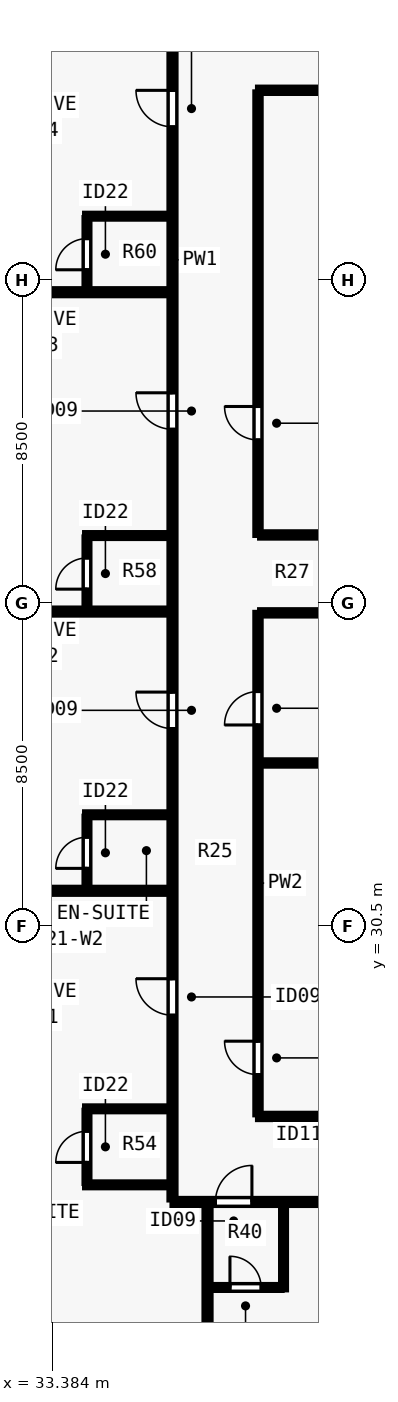
"""IFC4 building model, lengths in metres.
Left out: names, types, materials, properties, quantities, classifications, styles, units other than length and angle.
Written with IfcOpenShell. Run it as: python <this file> out.ifc"""

import sys

from ifc_helpers import new_model, si_unit, direction, frame, frame_2d, origin, place, context, subcontext, project, spatial, rectangle, extrude, element, fill, save


model = new_model("IFC4")
c1 = context("Model", 3, precision=1e-05, world=origin(), true_north=direction((0.0, 1.0)))
c2 = subcontext(c1, "Body", "Model", "MODEL_VIEW")
j1 = project(units=[si_unit("LENGTHUNIT", "METRE"), si_unit("PLANEANGLEUNIT", "RADIAN")], contexts=[c1])
p1 = place(None, origin())
s1 = spatial("IfcSite", under=j1, at=p1, CompositionType="ELEMENT")
p2 = place(p1, origin())
s2 = spatial("IfcBuilding", under=s1, at=p2, CompositionType="ELEMENT")
p3 = place(p2, frame((0.0, 0.0, 79.5)))
s3 = spatial("IfcBuildingStorey", under=s2, at=p3, CompositionType="ELEMENT", Elevation=79.5)
p4 = place(p3, frame((36.55, 23.25, 0.0), z_axis=(0.0, 0.0, 1.0), x_axis=(1.0, 0.0, 0.0)))
e1 = element("IfcWall", 1, at=p4, inside=s3, PredefinedType="PARTITIONING", context=c2, shape_type="SweptSolid", body=[
    extrude(rectangle(XDim=30.9, YDim=0.16, at=frame_2d((15.45, 0.0))), origin(), (0.0, 0.0, 1.0), 3.28),
])
p5 = place(p4, frame((1.13, 0.0, 0.0)))
e2 = element("IfcOpeningElement", 2, at=p5, cuts=e1, PredefinedType="OPENING", context=c2, shape_type="SweptSolid", body=[
    extrude(rectangle(XDim=0.96, YDim=2.15, at=frame_2d((0.48, 1.075))), frame((0.0, 0.09, 0.0), z_axis=(0.0, -1.0, 0.0), x_axis=(1.0, 0.0, 0.0)), (0.0, 0.0, 1.0), 0.18),
])
p6 = place(p4, frame((6.093, 0.0, 0.0)))
e3 = element("IfcOpeningElement", 3, at=p6, cuts=e1, PredefinedType="OPENING", context=c2, shape_type="SweptSolid", body=[
    extrude(rectangle(XDim=0.96, YDim=2.15, at=frame_2d((0.48, 1.075))), frame((0.0, 0.09, 0.0), z_axis=(0.0, -1.0, 0.0), x_axis=(1.0, 0.0, 0.0)), (0.0, 0.0, 1.0), 0.18),
])
p7 = place(p4, frame((16.125, 0.0, 0.0)))
e4 = element("IfcOpeningElement", 4, at=p7, cuts=e1, PredefinedType="OPENING", context=c2, shape_type="SweptSolid", body=[
    extrude(rectangle(XDim=0.96, YDim=2.15, at=frame_2d((0.48, 1.075))), frame((0.0, 0.09, 0.0), z_axis=(0.0, -1.0, 0.0), x_axis=(1.0, 0.0, 0.0)), (0.0, 0.0, 1.0), 0.18),
])
p8 = place(p4, frame((26.157, 0.0, 0.0)))
e5 = element("IfcOpeningElement", 5, at=p8, cuts=e1, PredefinedType="OPENING", context=c2, shape_type="SweptSolid", body=[
    extrude(rectangle(XDim=0.96, YDim=2.15, at=frame_2d((0.48, 1.075))), frame((0.0, 0.09, 0.0), z_axis=(0.0, -1.0, 0.0), x_axis=(1.0, 0.0, 0.0)), (0.0, 0.0, 1.0), 0.18),
])
p9 = place(p4, frame((28.92, 0.0, 0.0)))
e6 = element("IfcOpeningElement", 6, at=p9, cuts=e1, PredefinedType="OPENING", context=c2, shape_type="SweptSolid", body=[
    extrude(rectangle(XDim=0.96, YDim=2.15, at=frame_2d((0.48, 1.075))), frame((0.0, 0.09, 0.0), z_axis=(0.0, -1.0, 0.0), x_axis=(1.0, 0.0, 0.0)), (0.0, 0.0, 1.0), 0.18),
])
p10 = place(p3, frame((36.55, 23.315, 0.0), z_axis=(0.0, 0.0, 1.0), x_axis=(0.0, 1.0, 0.0)))
e7 = element("IfcWall", 7, at=p10, inside=s3, PredefinedType="PARTITIONING", context=c2, shape_type="SweptSolid", body=[
    extrude(rectangle(XDim=31.37, YDim=0.16, at=frame_2d((15.685, 0.0))), origin(), (0.0, 0.0, 1.0), 3.28),
])
p11 = place(p10, frame((4.848, 0.0, 0.0)))
e8 = element("IfcOpeningElement", 8, at=p11, cuts=e7, PredefinedType="OPENING", context=c2, shape_type="SweptSolid", body=[
    extrude(rectangle(XDim=0.96, YDim=2.15, at=frame_2d((0.48, 1.075))), frame((0.0, 0.09, 0.0), z_axis=(0.0, -1.0, 0.0), x_axis=(1.0, 0.0, 0.0)), (0.0, 0.0, 1.0), 0.18),
])
p12 = place(p10, frame((12.39, 0.0, 0.0)))
e9 = element("IfcOpeningElement", 9, at=p12, cuts=e7, PredefinedType="OPENING", context=c2, shape_type="SweptSolid", body=[
    extrude(rectangle(XDim=0.96, YDim=2.15, at=frame_2d((0.48, 1.075))), frame((0.0, 0.09, 0.0), z_axis=(0.0, -1.0, 0.0), x_axis=(1.0, 0.0, 0.0)), (0.0, 0.0, 1.0), 0.18),
])
p13 = place(p10, frame((20.265, 0.0, 0.0)))
e10 = element("IfcOpeningElement", 10, at=p13, cuts=e7, PredefinedType="OPENING", context=c2, shape_type="SweptSolid", body=[
    extrude(rectangle(XDim=0.96, YDim=2.15, at=frame_2d((0.48, 1.075))), frame((0.0, 0.09, 0.0), z_axis=(0.0, -1.0, 0.0), x_axis=(1.0, 0.0, 0.0)), (0.0, 0.0, 1.0), 0.18),
])
p14 = place(p10, frame((28.223, 0.0, 0.0)))
e11 = element("IfcOpeningElement", 11, at=p14, cuts=e7, PredefinedType="OPENING", context=c2, shape_type="SweptSolid", body=[
    extrude(rectangle(XDim=0.96, YDim=2.15, at=frame_2d((0.48, 1.075))), frame((0.0, 0.09, 0.0), z_axis=(0.0, -1.0, 0.0), x_axis=(1.0, 0.0, 0.0)), (0.0, 0.0, 1.0), 0.18),
])
p15 = place(p3, frame((38.8, 25.5, 0.0), z_axis=(0.0, 0.0, 1.0), x_axis=(1.0, 0.0, 0.0)))
e12 = element("IfcWall", 12, at=p15, inside=s3, PredefinedType="PARTITIONING", context=c2, shape_type="SweptSolid", body=[
    extrude(rectangle(XDim=26.4, YDim=0.14, at=frame_2d((13.2, 0.0))), origin(), (0.0, 0.0, 1.0), 3.28),
])
p16 = place(p15, frame((2.2, 0.0, 0.0)))
e13 = element("IfcOpeningElement", 13, at=p16, cuts=e12, PredefinedType="OPENING", context=c2, shape_type="SweptSolid", body=[
    extrude(rectangle(XDim=0.96, YDim=2.12, at=frame_2d((0.48, 1.06))), frame((0.0, 0.08, 0.0), z_axis=(0.0, -1.0, 0.0), x_axis=(1.0, 0.0, 0.0)), (0.0, 0.0, 1.0), 0.16),
])
p17 = place(p15, frame((15.2, 0.0, 0.0)))
e14 = element("IfcOpeningElement", 14, at=p17, cuts=e12, PredefinedType="OPENING", context=c2, shape_type="SweptSolid", body=[
    extrude(rectangle(XDim=0.96, YDim=2.12, at=frame_2d((0.48, 1.06))), frame((0.0, 0.08, 0.0), z_axis=(0.0, -1.0, 0.0), x_axis=(1.0, 0.0, 0.0)), (0.0, 0.0, 1.0), 0.16),
])
p18 = place(p3, frame((38.8, 52.5, 0.0), z_axis=(0.0, 0.0, 1.0), x_axis=(1.0, 0.0, 0.0)))
e15 = element("IfcWall", 15, at=p18, inside=s3, PredefinedType="PARTITIONING", context=c2, shape_type="SweptSolid", body=[
    extrude(rectangle(XDim=26.4, YDim=0.14, at=frame_2d((13.2, 0.0))), origin(), (0.0, 0.0, 1.0), 3.28),
])
p19 = place(p18, frame((3.2, 0.0, 0.0)))
e16 = element("IfcOpeningElement", 16, at=p19, cuts=e15, PredefinedType="OPENING", context=c2, shape_type="SweptSolid", body=[
    extrude(rectangle(XDim=0.96, YDim=2.12, at=frame_2d((0.48, 1.06))), frame((0.0, 0.08, 0.0), z_axis=(0.0, -1.0, 0.0), x_axis=(1.0, 0.0, 0.0)), (0.0, 0.0, 1.0), 0.16),
])
p20 = place(p18, frame((19.2, 0.0, 0.0)))
e17 = element("IfcOpeningElement", 17, at=p20, cuts=e15, PredefinedType="OPENING", context=c2, shape_type="SweptSolid", body=[
    extrude(rectangle(XDim=0.96, YDim=2.12, at=frame_2d((0.48, 1.06))), frame((0.0, 0.08, 0.0), z_axis=(0.0, -1.0, 0.0), x_axis=(1.0, 0.0, 0.0)), (0.0, 0.0, 1.0), 0.16),
])
p21 = place(p3, frame((38.8, 25.555, 0.0), z_axis=(0.0, 0.0, 1.0), x_axis=(0.0, 1.0, 0.0)))
e18 = element("IfcWall", 18, at=p21, inside=s3, PredefinedType="PARTITIONING", context=c2, shape_type="SweptSolid", body=[
    extrude(rectangle(XDim=13.195, YDim=0.14, at=frame_2d((6.598, 0.0))), origin(), (0.0, 0.0, 1.0), 3.28),
])
p22 = place(p21, frame((1.045, 0.0, 0.0)))
e19 = element("IfcOpeningElement", 19, at=p22, cuts=e18, PredefinedType="OPENING", context=c2, shape_type="SweptSolid", body=[
    extrude(rectangle(XDim=0.88, YDim=2.1, at=frame_2d((0.44, 1.05))), frame((0.0, 0.08, 0.0), z_axis=(0.0, -1.0, 0.0), x_axis=(1.0, 0.0, 0.0)), (0.0, 0.0, 1.0), 0.16),
])
p23 = place(p21, frame((10.245, 0.0, 0.0)))
e20 = element("IfcOpeningElement", 20, at=p23, cuts=e18, PredefinedType="OPENING", context=c2, shape_type="SweptSolid", body=[
    extrude(rectangle(XDim=0.88, YDim=2.1, at=frame_2d((0.44, 1.05))), frame((0.0, 0.08, 0.0), z_axis=(0.0, -1.0, 0.0), x_axis=(1.0, 0.0, 0.0)), (0.0, 0.0, 1.0), 0.16),
])
p24 = place(p3, frame((38.8, 40.8, 0.0), z_axis=(0.0, 0.0, 1.0), x_axis=(0.0, 1.0, 0.0)))
e21 = element("IfcWall", 21, at=p24, inside=s3, PredefinedType="PARTITIONING", context=c2, shape_type="SweptSolid", body=[
    extrude(rectangle(XDim=11.645, YDim=0.14, at=frame_2d((5.823, 0.0))), origin(), (0.0, 0.0, 1.0), 3.28),
])
p25 = place(p24, frame((2.5, 0.0, 0.0)))
e22 = element("IfcOpeningElement", 22, at=p25, cuts=e21, PredefinedType="OPENING", context=c2, shape_type="SweptSolid", body=[
    extrude(rectangle(XDim=0.88, YDim=2.1, at=frame_2d((0.44, 1.05))), frame((0.0, 0.08, 0.0), z_axis=(0.0, -1.0, 0.0), x_axis=(1.0, 0.0, 0.0)), (0.0, 0.0, 1.0), 0.16),
])
for number, where, z_axis, x_axis in (
    (23, (38.855, 38.75, 0.0), (0.0, 0.0, 1.0), (1.0, 0.0, 0.0)),
    (24, (38.855, 40.8, 0.0), (0.0, 0.0, 1.0), (1.0, 0.0, 0.0)),
    (25, (38.855, 34.8, 0.0), (0.0, 0.0, 1.0), (1.0, 0.0, 0.0)),
):
    element("IfcWall", number, at=place(p3, frame(where, z_axis=z_axis, x_axis=x_axis)), inside=s3, PredefinedType="PARTITIONING", context=c2, shape_type="SweptSolid", body=[
        extrude(rectangle(XDim=4.385, YDim=0.14, at=frame_2d((2.192, 0.0))), origin(), (0.0, 0.0, 1.0), 3.28),
    ])
p26 = place(p3, frame((37.472, 13.845, 0.0), z_axis=(0.0, 0.0, 1.0), x_axis=(0.0, 1.0, 0.0)))
e26 = element("IfcWall", 26, at=p26, inside=s3, PredefinedType="PARTITIONING", context=c2, shape_type="SweptSolid", body=[
    extrude(rectangle(XDim=9.34, YDim=0.16, at=frame_2d((4.67, 0.0))), origin(), (0.0, 0.0, 1.0), 3.28),
])
p27 = place(p3, frame((39.472, 20.95, 0.0), z_axis=(0.0, 0.0, 1.0), x_axis=(0.0, 1.0, 0.0)))
e27 = element("IfcWall", 27, at=p27, inside=s3, PredefinedType="PLUMBINGWALL", context=c2, shape_type="SweptSolid", body=[
    extrude(rectangle(XDim=2.235, YDim=0.13, at=frame_2d((1.118, 0.0))), origin(), (0.0, 0.0, 1.0), 3.28),
])
p28 = place(p3, frame((37.537, 21.0, 0.0), z_axis=(0.0, 0.0, 1.0), x_axis=(1.0, 0.0, 0.0)))
e28 = element("IfcWall", 28, at=p28, inside=s3, PredefinedType="PLUMBINGWALL", context=c2, shape_type="SweptSolid", body=[
    extrude(rectangle(XDim=1.885, YDim=0.13, at=frame_2d((0.942, 0.0))), origin(), (0.0, 0.0, 1.0), 3.28),
])
p29 = place(p28, frame((0.525, 0.0, 0.0)))
e29 = element("IfcOpeningElement", 29, at=p29, cuts=e28, PredefinedType="OPENING", context=c2, shape_type="SweptSolid", body=[
    extrude(rectangle(XDim=0.82, YDim=2.1, at=frame_2d((0.41, 1.05))), frame((0.0, 0.075, 0.0), z_axis=(0.0, -1.0, 0.0), x_axis=(1.0, 0.0, 0.0)), (0.0, 0.0, 1.0), 0.15),
])
p30 = place(p3, frame((34.25, 23.7, 0.0), z_axis=(0.0, 0.0, 1.0), x_axis=(1.0, 0.0, 0.0)))
e30 = element("IfcWall", 30, at=p30, inside=s3, PredefinedType="PLUMBINGWALL", context=c2, shape_type="SweptSolid", body=[
    extrude(rectangle(XDim=2.235, YDim=0.13, at=frame_2d((1.118, 0.0))), origin(), (0.0, 0.0, 1.0), 2.849),
])
p31 = place(p3, frame((34.25, 25.7, 0.0), z_axis=(0.0, 0.0, 1.0), x_axis=(1.0, 0.0, 0.0)))
e31 = element("IfcWall", 31, at=p31, inside=s3, PredefinedType="PLUMBINGWALL", context=c2, shape_type="SweptSolid", body=[
    extrude(rectangle(XDim=2.235, YDim=0.13, at=frame_2d((1.118, 0.0))), origin(), (0.0, 0.0, 1.0), 3.28),
])
p32 = place(p3, frame((34.3, 23.75, 0.0), z_axis=(0.0, 0.0, 1.0), x_axis=(0.0, 1.0, 0.0)))
e32 = element("IfcWall", 32, at=p32, inside=s3, PredefinedType="PLUMBINGWALL", context=c2, shape_type="SweptSolid", body=[
    extrude(rectangle(XDim=1.9, YDim=0.13, at=frame_2d((0.95, 0.0))), origin(), (0.0, 0.0, 1.0), 3.28),
])
p33 = place(p32, frame((0.54, 0.0, 0.0)))
e33 = element("IfcOpeningElement", 33, at=p33, cuts=e32, PredefinedType="OPENING", context=c2, shape_type="SweptSolid", body=[
    extrude(rectangle(XDim=0.82, YDim=2.1, at=frame_2d((0.41, 1.05))), frame((0.0, 0.075, 0.0), z_axis=(0.0, -1.0, 0.0), x_axis=(1.0, 0.0, 0.0)), (0.0, 0.0, 1.0), 0.15),
])
p34 = place(p3, frame((26.845, 31.437, 0.0), z_axis=(0.0, 0.0, 1.0), x_axis=(1.0, 0.0, 0.0)))
e34 = element("IfcWall", 34, at=p34, inside=s3, PredefinedType="PARTITIONING", context=c2, shape_type="SweptSolid", body=[
    extrude(rectangle(XDim=9.64, YDim=0.16, at=frame_2d((4.82, 0.0))), origin(), (0.0, 0.0, 1.0), 3.28),
])
p35 = place(p3, frame((34.25, 33.437, 0.0), z_axis=(0.0, 0.0, 1.0), x_axis=(1.0, 0.0, 0.0)))
e35 = element("IfcWall", 35, at=p35, inside=s3, PredefinedType="PLUMBINGWALL", context=c2, shape_type="SweptSolid", body=[
    extrude(rectangle(XDim=2.235, YDim=0.13, at=frame_2d((1.118, 0.0))), origin(), (0.0, 0.0, 1.0), 3.28),
])
p36 = place(p3, frame((34.3, 31.502, 0.0), z_axis=(0.0, 0.0, 1.0), x_axis=(0.0, 1.0, 0.0)))
e36 = element("IfcWall", 36, at=p36, inside=s3, PredefinedType="PLUMBINGWALL", context=c2, shape_type="SweptSolid", body=[
    extrude(rectangle(XDim=1.885, YDim=0.13, at=frame_2d((0.942, 0.0))), origin(), (0.0, 0.0, 1.0), 3.28),
])
p37 = place(p36, frame((0.525, 0.0, 0.0)))
e37 = element("IfcOpeningElement", 37, at=p37, cuts=e36, PredefinedType="OPENING", context=c2, shape_type="SweptSolid", body=[
    extrude(rectangle(XDim=0.82, YDim=2.1, at=frame_2d((0.41, 1.05))), frame((0.0, 0.075, 0.0), z_axis=(0.0, -1.0, 0.0), x_axis=(1.0, 0.0, 0.0)), (0.0, 0.0, 1.0), 0.15),
])
p38 = place(p3, frame((26.845, 38.784, 0.0), z_axis=(0.0, 0.0, 1.0), x_axis=(1.0, 0.0, 0.0)))
e38 = element("IfcWall", 38, at=p38, inside=s3, PredefinedType="PARTITIONING", context=c2, shape_type="SweptSolid", body=[
    extrude(rectangle(XDim=9.64, YDim=0.16, at=frame_2d((4.82, 0.0))), origin(), (0.0, 0.0, 1.0), 2.849),
])
p39 = place(p3, frame((34.25, 40.784, 0.0), z_axis=(0.0, 0.0, 1.0), x_axis=(1.0, 0.0, 0.0)))
e39 = element("IfcWall", 39, at=p39, inside=s3, PredefinedType="PLUMBINGWALL", context=c2, shape_type="SweptSolid", body=[
    extrude(rectangle(XDim=2.235, YDim=0.13, at=frame_2d((1.118, 0.0))), origin(), (0.0, 0.0, 1.0), 2.849),
])
p40 = place(p3, frame((34.3, 38.849, 0.0), z_axis=(0.0, 0.0, 1.0), x_axis=(0.0, 1.0, 0.0)))
e40 = element("IfcWall", 40, at=p40, inside=s3, PredefinedType="PLUMBINGWALL", context=c2, shape_type="SweptSolid", body=[
    extrude(rectangle(XDim=1.885, YDim=0.13, at=frame_2d((0.942, 0.0))), origin(), (0.0, 0.0, 1.0), 3.28),
])
p41 = place(p40, frame((0.525, 0.0, 0.0)))
e41 = element("IfcOpeningElement", 41, at=p41, cuts=e40, PredefinedType="OPENING", context=c2, shape_type="SweptSolid", body=[
    extrude(rectangle(XDim=0.82, YDim=2.1, at=frame_2d((0.41, 1.05))), frame((0.0, 0.075, 0.0), z_axis=(0.0, -1.0, 0.0), x_axis=(1.0, 0.0, 0.0)), (0.0, 0.0, 1.0), 0.15),
])
p42 = place(p3, frame((26.845, 47.187, 0.0), z_axis=(0.0, 0.0, 1.0), x_axis=(1.0, 0.0, 0.0)))
e42 = element("IfcWall", 42, at=p42, inside=s3, PredefinedType="PARTITIONING", context=c2, shape_type="SweptSolid", body=[
    extrude(rectangle(XDim=9.64, YDim=0.16, at=frame_2d((4.82, 0.0))), origin(), (0.0, 0.0, 1.0), 3.28),
])
p43 = place(p3, frame((34.25, 49.187, 0.0), z_axis=(0.0, 0.0, 1.0), x_axis=(1.0, 0.0, 0.0)))
e43 = element("IfcWall", 43, at=p43, inside=s3, PredefinedType="PLUMBINGWALL", context=c2, shape_type="SweptSolid", body=[
    extrude(rectangle(XDim=2.235, YDim=0.13, at=frame_2d((1.118, 0.0))), origin(), (0.0, 0.0, 1.0), 3.28),
])
p44 = place(p3, frame((34.3, 47.252, 0.0), z_axis=(0.0, 0.0, 1.0), x_axis=(0.0, 1.0, 0.0)))
e44 = element("IfcWall", 44, at=p44, inside=s3, PredefinedType="PLUMBINGWALL", context=c2, shape_type="SweptSolid", body=[
    extrude(rectangle(XDim=1.885, YDim=0.13, at=frame_2d((0.942, 0.0))), origin(), (0.0, 0.0, 1.0), 3.28),
])
p45 = place(p44, frame((0.525, 0.0, 0.0)))
e45 = element("IfcOpeningElement", 45, at=p45, cuts=e44, PredefinedType="OPENING", context=c2, shape_type="SweptSolid", body=[
    extrude(rectangle(XDim=0.82, YDim=2.1, at=frame_2d((0.41, 1.05))), frame((0.0, 0.075, 0.0), z_axis=(0.0, -1.0, 0.0), x_axis=(1.0, 0.0, 0.0)), (0.0, 0.0, 1.0), 0.15),
])
p46 = place(p22, origin())
e46 = element("IfcDoor", 46, at=p46, inside=s3, OperationType="SINGLE_SWING_RIGHT", PredefinedType="DOOR", context=c2, shape_type="SweptSolid", body=[
    extrude(rectangle(XDim=0.88, YDim=2.1, at=frame_2d((0.44, 1.05))), frame((0.0, 0.025, 0.0), z_axis=(0.0, -1.0, 0.0), x_axis=(1.0, 0.0, 0.0)), (0.0, 0.0, 1.0), 0.05),
])
fill(e19, e46)
p47 = place(p23, origin())
e47 = element("IfcDoor", 47, at=p47, inside=s3, OperationType="SINGLE_SWING_LEFT", PredefinedType="DOOR", context=c2, shape_type="SweptSolid", body=[
    extrude(rectangle(XDim=0.88, YDim=2.1, at=frame_2d((0.44, 1.05))), frame((0.0, 0.025, 0.0), z_axis=(0.0, -1.0, 0.0), x_axis=(1.0, 0.0, 0.0)), (0.0, 0.0, 1.0), 0.05),
])
fill(e20, e47)
p48 = place(p25, origin())
e48 = element("IfcDoor", 48, at=p48, inside=s3, OperationType="SINGLE_SWING_RIGHT", PredefinedType="DOOR", context=c2, shape_type="SweptSolid", body=[
    extrude(rectangle(XDim=0.88, YDim=2.1, at=frame_2d((0.44, 1.05))), frame((0.0, 0.025, 0.0), z_axis=(0.0, -1.0, 0.0), x_axis=(1.0, 0.0, 0.0)), (0.0, 0.0, 1.0), 0.05),
])
fill(e22, e48)
p49 = place(p5, origin())
e49 = element("IfcDoor", 49, at=p49, inside=s3, OperationType="SINGLE_SWING_RIGHT", PredefinedType="DOOR", context=c2, shape_type="SweptSolid", body=[
    extrude(rectangle(XDim=0.96, YDim=2.15, at=frame_2d((0.48, 1.075))), frame((0.0, 0.025, 0.0), z_axis=(0.0, -1.0, 0.0), x_axis=(1.0, 0.0, 0.0)), (0.0, 0.0, 1.0), 0.05),
])
fill(e2, e49)
p50 = place(p29, origin())
e50 = element("IfcDoor", 50, at=p50, inside=s3, OperationType="SINGLE_SWING_LEFT", PredefinedType="DOOR", context=c2, shape_type="SweptSolid", body=[
    extrude(rectangle(XDim=0.82, YDim=2.1, at=frame_2d((0.41, 1.05))), frame((0.0, 0.025, 0.0), z_axis=(0.0, -1.0, 0.0), x_axis=(1.0, 0.0, 0.0)), (0.0, 0.0, 1.0), 0.05),
])
fill(e29, e50)
p51 = place(p33, origin())
e51 = element("IfcDoor", 51, at=p51, inside=s3, OperationType="SINGLE_SWING_LEFT", PredefinedType="DOOR", context=c2, shape_type="SweptSolid", body=[
    extrude(rectangle(XDim=0.82, YDim=2.1, at=frame_2d((0.41, 1.05))), frame((0.0, 0.025, 0.0), z_axis=(0.0, -1.0, 0.0), x_axis=(1.0, 0.0, 0.0)), (0.0, 0.0, 1.0), 0.05),
])
fill(e33, e51)
p52 = place(p11, origin())
e52 = element("IfcDoor", 52, at=p52, inside=s3, OperationType="SINGLE_SWING_RIGHT", PredefinedType="DOOR", context=c2, shape_type="SweptSolid", body=[
    extrude(rectangle(XDim=0.96, YDim=2.15, at=frame_2d((0.48, 1.075))), frame((0.0, 0.025, 0.0), z_axis=(0.0, -1.0, 0.0), x_axis=(1.0, 0.0, 0.0)), (0.0, 0.0, 1.0), 0.05),
])
fill(e8, e52)
p53 = place(p37, origin())
e53 = element("IfcDoor", 53, at=p53, inside=s3, OperationType="SINGLE_SWING_LEFT", PredefinedType="DOOR", context=c2, shape_type="SweptSolid", body=[
    extrude(rectangle(XDim=0.82, YDim=2.1, at=frame_2d((0.41, 1.05))), frame((0.0, 0.025, 0.0), z_axis=(0.0, -1.0, 0.0), x_axis=(1.0, 0.0, 0.0)), (0.0, 0.0, 1.0), 0.05),
])
fill(e37, e53)
p54 = place(p12, origin())
e54 = element("IfcDoor", 54, at=p54, inside=s3, OperationType="SINGLE_SWING_RIGHT", PredefinedType="DOOR", context=c2, shape_type="SweptSolid", body=[
    extrude(rectangle(XDim=0.96, YDim=2.15, at=frame_2d((0.48, 1.075))), frame((0.0, 0.025, 0.0), z_axis=(0.0, -1.0, 0.0), x_axis=(1.0, 0.0, 0.0)), (0.0, 0.0, 1.0), 0.05),
])
fill(e9, e54)
p55 = place(p41, origin())
e55 = element("IfcDoor", 55, at=p55, inside=s3, OperationType="SINGLE_SWING_LEFT", PredefinedType="DOOR", context=c2, shape_type="SweptSolid", body=[
    extrude(rectangle(XDim=0.82, YDim=2.1, at=frame_2d((0.41, 1.05))), frame((0.0, 0.025, 0.0), z_axis=(0.0, -1.0, 0.0), x_axis=(1.0, 0.0, 0.0)), (0.0, 0.0, 1.0), 0.05),
])
fill(e41, e55)
p56 = place(p13, origin())
e56 = element("IfcDoor", 56, at=p56, inside=s3, OperationType="SINGLE_SWING_RIGHT", PredefinedType="DOOR", context=c2, shape_type="SweptSolid", body=[
    extrude(rectangle(XDim=0.96, YDim=2.15, at=frame_2d((0.48, 1.075))), frame((0.0, 0.025, 0.0), z_axis=(0.0, -1.0, 0.0), x_axis=(1.0, 0.0, 0.0)), (0.0, 0.0, 1.0), 0.05),
])
fill(e10, e56)
p57 = place(p45, origin())
e57 = element("IfcDoor", 57, at=p57, inside=s3, OperationType="SINGLE_SWING_LEFT", PredefinedType="DOOR", context=c2, shape_type="SweptSolid", body=[
    extrude(rectangle(XDim=0.82, YDim=2.1, at=frame_2d((0.41, 1.05))), frame((0.0, 0.025, 0.0), z_axis=(0.0, -1.0, 0.0), x_axis=(1.0, 0.0, 0.0)), (0.0, 0.0, 1.0), 0.05),
])
fill(e45, e57)
p58 = place(p14, origin())
e58 = element("IfcDoor", 58, at=p58, inside=s3, OperationType="SINGLE_SWING_RIGHT", PredefinedType="DOOR", context=c2, shape_type="SweptSolid", body=[
    extrude(rectangle(XDim=0.96, YDim=2.15, at=frame_2d((0.48, 1.075))), frame((0.0, 0.025, 0.0), z_axis=(0.0, -1.0, 0.0), x_axis=(1.0, 0.0, 0.0)), (0.0, 0.0, 1.0), 0.05),
])
fill(e11, e58)
save(model, sys.argv[1])
